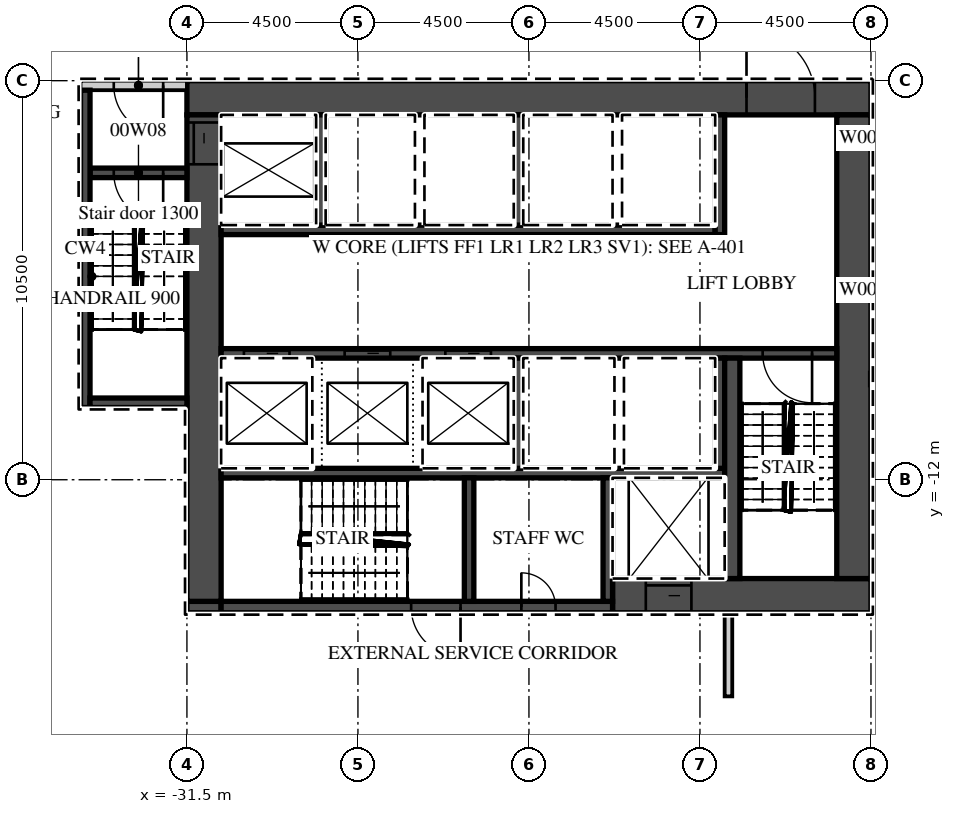
"""IFC4 building model, lengths in metres.
Left out: names, types, materials, properties, quantities, classifications, styles, units other than length and angle.
Written with IfcOpenShell. Run it as: python <this file> out.ifc"""

import sys

from ifc_helpers import new_model, si_unit, direction, frame, frame_2d, origin, place, context, subcontext, project, spatial, rectangle, extrude, element, fill, save


model = new_model("IFC4")
c1 = context("Model", 3, precision=1e-05, world=origin(), true_north=direction((0.0, 1.0)))
c2 = subcontext(c1, "Body", "Model", "MODEL_VIEW")
j1 = project(units=[si_unit("LENGTHUNIT", "METRE"), si_unit("PLANEANGLEUNIT", "RADIAN")], contexts=[c1])
p1 = place(None, origin())
s1 = spatial("IfcSite", under=j1, at=p1, CompositionType="ELEMENT")
p2 = place(p1, origin())
s2 = spatial("IfcBuilding", under=s1, at=p2, CompositionType="ELEMENT")
p3 = place(p2, origin())
s3 = spatial("IfcBuildingStorey", under=s2, at=p3, CompositionType="ELEMENT", Elevation=0.0)
p4 = place(p3, frame((-31.5, -1.95, 0.0), z_axis=(0.0, 0.0, 1.0), x_axis=(1.0, 0.0, 0.0)))
e1 = element("IfcWall", 1, at=p4, inside=s3, PredefinedType="SHEAR", context=c2, shape_type="SweptSolid", body=[
    extrude(rectangle(XDim=18.0, YDim=0.9, at=frame_2d((9.0, 0.0))), origin(), (0.0, 0.0, 1.0), 10.55),
])
p5 = place(p4, frame((14.725, 0.0, 0.0)))
e2 = element("IfcOpeningElement", 2, at=p5, cuts=e1, PredefinedType="OPENING", context=c2, shape_type="SweptSolid", body=[
    extrude(rectangle(XDim=1.8, YDim=2.1, at=frame_2d((0.9, 1.05))), frame((0.0, 0.46, 0.0), z_axis=(0.0, -1.0, 0.0), x_axis=(1.0, 0.0, 0.0)), (0.0, 0.0, 1.0), 0.92),
])
p6 = place(p3, frame((-20.3, -15.05, 0.0), z_axis=(0.0, 0.0, 1.0), x_axis=(1.0, 0.0, 0.0)))
e3 = element("IfcWall", 3, at=p6, inside=s3, PredefinedType="SHEAR", context=c2, shape_type="SweptSolid", body=[
    extrude(rectangle(XDim=6.8, YDim=0.9, at=frame_2d((3.4, 0.0))), origin(), (0.0, 0.0, 1.0), 10.55),
])
p7 = place(p6, frame((0.875, 0.0, 0.0)))
e4 = element("IfcOpeningElement", 4, at=p7, cuts=e3, PredefinedType="OPENING", context=c2, shape_type="SweptSolid", body=[
    extrude(rectangle(XDim=1.2, YDim=2.1, at=frame_2d((0.6, 1.05))), frame((0.0, 0.46, 0.0), z_axis=(0.0, -1.0, 0.0), x_axis=(1.0, 0.0, 0.0)), (0.0, 0.0, 1.0), 0.92),
])
p8 = place(p3, frame((-31.5, -15.35, 0.0), z_axis=(0.0, 0.0, 1.0), x_axis=(1.0, 0.0, 0.0)))
e5 = element("IfcWall", 5, at=p8, inside=s3, PredefinedType="SHEAR", context=c2, shape_type="SweptSolid", body=[
    extrude(rectangle(XDim=0.9, YDim=0.3, at=frame_2d((0.45, 0.0))), origin(), (0.0, 0.0, 1.0), 10.55),
])
p9 = place(p3, frame((-30.6, -15.35, 0.0), z_axis=(0.0, 0.0, 1.0), x_axis=(1.0, 0.0, 0.0)))
e6 = element("IfcWall", 6, at=p9, inside=s3, PredefinedType="SHEAR", context=c2, shape_type="SweptSolid", body=[
    extrude(rectangle(XDim=10.3, YDim=0.3, at=frame_2d((5.15, 0.0))), origin(), (0.0, 0.0, 1.0), 10.55),
])
p10 = place(p9, frame((5.0, 0.0, 0.0)))
e7 = element("IfcOpeningElement", 7, at=p10, cuts=e6, PredefinedType="OPENING", context=c2, shape_type="SweptSolid", body=[
    extrude(rectangle(XDim=1.3, YDim=2.1, at=frame_2d((0.65, 1.05))), frame((0.0, 0.16, 0.0), z_axis=(0.0, -1.0, 0.0), x_axis=(1.0, 0.0, 0.0)), (0.0, 0.0, 1.0), 0.32),
])
p11 = place(p9, frame((7.9, 0.0, 0.0)))
e8 = element("IfcOpeningElement", 8, at=p11, cuts=e6, PredefinedType="OPENING", context=c2, shape_type="SweptSolid", body=[
    extrude(rectangle(XDim=0.9, YDim=2.1, at=frame_2d((0.45, 1.05))), frame((0.0, 0.16, 0.0), z_axis=(0.0, -1.0, 0.0), x_axis=(1.0, 0.0, 0.0)), (0.0, 0.0, 1.0), 0.32),
])
p12 = place(p3, frame((-31.05, -15.2, 0.0), z_axis=(0.0, 0.0, 1.0), x_axis=(0.0, 1.0, 0.0)))
e9 = element("IfcWall", 9, at=p12, inside=s3, PredefinedType="SHEAR", context=c2, shape_type="SweptSolid", body=[
    extrude(rectangle(XDim=12.8, YDim=0.9, at=frame_2d((6.4, 0.0))), origin(), (0.0, 0.0, 1.0), 10.55),
])
p13 = place(p12, frame((11.5, 0.0, 0.0)))
e10 = element("IfcOpeningElement", 10, at=p13, cuts=e9, PredefinedType="OPENING", context=c2, shape_type="SweptSolid", body=[
    extrude(rectangle(XDim=1.1, YDim=2.1, at=frame_2d((0.55, 1.05))), frame((0.0, 0.46, 0.0), z_axis=(0.0, -1.0, 0.0), x_axis=(1.0, 0.0, 0.0)), (0.0, 0.0, 1.0), 0.92),
])
p14 = place(p3, frame((-13.95, -14.6, 0.0), z_axis=(0.0, 0.0, 1.0), x_axis=(0.0, 1.0, 0.0)))
e11 = element("IfcWall", 11, at=p14, inside=s3, PredefinedType="SHEAR", context=c2, shape_type="SweptSolid", body=[
    extrude(rectangle(XDim=12.2, YDim=0.9, at=frame_2d((6.1, 0.0))), origin(), (0.0, 0.0, 1.0), 10.55),
])
p15 = place(p3, frame((-30.6, -5.425, 0.0), z_axis=(0.0, 0.0, 1.0), x_axis=(1.0, 0.0, 0.0)))
e12 = element("IfcWall", 12, at=p15, inside=s3, PredefinedType="SHEAR", context=c2, shape_type="SweptSolid", body=[
    extrude(rectangle(XDim=13.0, YDim=0.25, at=frame_2d((6.5, 0.0))), origin(), (0.0, 0.0, 1.0), 10.55),
])
p16 = place(p3, frame((-17.475, -5.55, 0.0), z_axis=(0.0, 0.0, 1.0), x_axis=(0.0, 1.0, 0.0)))
e13 = element("IfcWall", 13, at=p16, inside=s3, PredefinedType="SHEAR", context=c2, shape_type="SweptSolid", body=[
    extrude(rectangle(XDim=3.15, YDim=0.25, at=frame_2d((1.575, 0.0))), origin(), (0.0, 0.0, 1.0), 10.55),
])
for number, where, z_axis, x_axis in (
    (14, (-27.975, -5.3, 0.0), (0.0, 0.0, 1.0), (0.0, 1.0, 0.0)),
    (15, (-22.775, -5.3, 0.0), (0.0, 0.0, 1.0), (0.0, 1.0, 0.0)),
):
    element("IfcWall", number, at=place(p3, frame(where, z_axis=z_axis, x_axis=x_axis)), inside=s3, PredefinedType="SHEAR", context=c2, shape_type="SweptSolid", body=[
        extrude(rectangle(XDim=2.9, YDim=0.25, at=frame_2d((1.45, 0.0))), origin(), (0.0, 0.0, 1.0), 10.55),
    ])
p17 = place(p3, frame((-30.6, -8.675, 0.0), z_axis=(0.0, 0.0, 1.0), x_axis=(1.0, 0.0, 0.0)))
e16 = element("IfcWall", 16, at=p17, inside=s3, PredefinedType="SHEAR", context=c2, shape_type="SweptSolid", body=[
    extrude(rectangle(XDim=16.2, YDim=0.25, at=frame_2d((8.1, 0.0))), origin(), (0.0, 0.0, 1.0), 10.55),
])
p18 = place(p17, frame((0.6, 0.0, 0.0)))
e17 = element("IfcOpeningElement", 17, at=p18, cuts=e16, PredefinedType="OPENING", context=c2, shape_type="SweptSolid", body=[
    extrude(rectangle(XDim=1.2, YDim=2.1, at=frame_2d((0.6, 1.05))), frame((0.0, 0.135, 0.0), z_axis=(0.0, -1.0, 0.0), x_axis=(1.0, 0.0, 0.0)), (0.0, 0.0, 1.0), 0.27),
])
p19 = place(p17, frame((3.25, 0.0, 0.0)))
e18 = element("IfcOpeningElement", 18, at=p19, cuts=e16, PredefinedType="OPENING", context=c2, shape_type="SweptSolid", body=[
    extrude(rectangle(XDim=1.2, YDim=2.1, at=frame_2d((0.6, 1.05))), frame((0.0, 0.135, 0.0), z_axis=(0.0, -1.0, 0.0), x_axis=(1.0, 0.0, 0.0)), (0.0, 0.0, 1.0), 0.27),
])
p20 = place(p17, frame((5.9, 0.0, 0.0)))
e19 = element("IfcOpeningElement", 19, at=p20, cuts=e16, PredefinedType="OPENING", context=c2, shape_type="SweptSolid", body=[
    extrude(rectangle(XDim=1.2, YDim=2.1, at=frame_2d((0.6, 1.05))), frame((0.0, 0.135, 0.0), z_axis=(0.0, -1.0, 0.0), x_axis=(1.0, 0.0, 0.0)), (0.0, 0.0, 1.0), 0.27),
])
p21 = place(p17, frame((14.25, 0.0, 0.0)))
e20 = element("IfcOpeningElement", 20, at=p21, cuts=e16, PredefinedType="OPENING", context=c2, shape_type="SweptSolid", body=[
    extrude(rectangle(XDim=1.3, YDim=2.1, at=frame_2d((0.65, 1.05))), frame((0.0, 0.135, 0.0), z_axis=(0.0, -1.0, 0.0), x_axis=(1.0, 0.0, 0.0)), (0.0, 0.0, 1.0), 0.27),
])
p22 = place(p3, frame((-30.6, -11.825, 0.0), z_axis=(0.0, 0.0, 1.0), x_axis=(1.0, 0.0, 0.0)))
e21 = element("IfcWall", 21, at=p22, inside=s3, PredefinedType="SHEAR", context=c2, shape_type="SweptSolid", body=[
    extrude(rectangle(XDim=13.25, YDim=0.25, at=frame_2d((6.625, 0.0))), origin(), (0.0, 0.0, 1.0), 10.55),
])
for number, where, z_axis, x_axis in (
    (22, (-17.475, -11.7, 0.0), (0.0, 0.0, 1.0), (0.0, 1.0, 0.0)),
    (23, (-22.775, -11.7, 0.0), (0.0, 0.0, 1.0), (0.0, 1.0, 0.0)),
):
    element("IfcWall", number, at=place(p3, frame(where, z_axis=z_axis, x_axis=x_axis)), inside=s3, PredefinedType="SHEAR", context=c2, shape_type="SweptSolid", body=[
        extrude(rectangle(XDim=2.9, YDim=0.25, at=frame_2d((1.45, 0.0))), origin(), (0.0, 0.0, 1.0), 10.55),
    ])
p23 = place(p3, frame((-17.15, -14.6, 0.0), z_axis=(0.0, 0.0, 1.0), x_axis=(0.0, 1.0, 0.0)))
e24 = element("IfcWall", 24, at=p23, inside=s3, PredefinedType="SHEAR", context=c2, shape_type="SweptSolid", body=[
    extrude(rectangle(XDim=5.8, YDim=0.4, at=frame_2d((2.9, 0.0))), origin(), (0.0, 0.0, 1.0), 10.55),
])
for number, where, z_axis, x_axis in (
    (25, (-20.425, -15.2, 0.0), (0.0, 0.0, 1.0), (0.0, 1.0, 0.0)),
    (26, (-24.075, -15.2, 0.0), (0.0, 0.0, 1.0), (0.0, 1.0, 0.0)),
):
    element("IfcWall", number, at=place(p3, frame(where, z_axis=z_axis, x_axis=x_axis)), inside=s3, PredefinedType="SHEAR", context=c2, shape_type="SweptSolid", body=[
        extrude(rectangle(XDim=3.25, YDim=0.25, at=frame_2d((1.625, 0.0))), origin(), (0.0, 0.0, 1.0), 10.55),
    ])
p24 = place(p3, frame((-34.3, -1.625, 0.0), z_axis=(0.0, 0.0, 1.0), x_axis=(1.0, 0.0, 0.0)))
e27 = element("IfcWall", 27, at=p24, inside=s3, PredefinedType="PARTITIONING", context=c2, shape_type="SweptSolid", body=[
    extrude(rectangle(XDim=2.8, YDim=0.25, at=frame_2d((1.4, 0.0))), origin(), (0.0, 0.0, 1.0), 10.55),
])
p25 = place(p24, frame((0.875, 0.0, 0.0)))
e28 = element("IfcOpeningElement", 28, at=p25, cuts=e27, PredefinedType="OPENING", context=c2, shape_type="SweptSolid", body=[
    extrude(rectangle(XDim=1.3, YDim=2.1, at=frame_2d((0.65, 1.05))), frame((0.0, 0.135, 0.0), z_axis=(0.0, -1.0, 0.0), x_axis=(1.0, 0.0, 0.0)), (0.0, 0.0, 1.0), 0.27),
])
p26 = place(p3, frame((-34.05, -3.925, 0.0), z_axis=(0.0, 0.0, 1.0), x_axis=(1.0, 0.0, 0.0)))
e29 = element("IfcWall", 29, at=p26, inside=s3, PredefinedType="SHEAR", context=c2, shape_type="SweptSolid", body=[
    extrude(rectangle(XDim=2.55, YDim=0.25, at=frame_2d((1.275, 0.0))), origin(), (0.0, 0.0, 1.0), 10.55),
])
p27 = place(p26, frame((0.625, 0.0, 0.0)))
e30 = element("IfcOpeningElement", 30, at=p27, cuts=e29, PredefinedType="OPENING", context=c2, shape_type="SweptSolid", body=[
    extrude(rectangle(XDim=1.3, YDim=2.1, at=frame_2d((0.65, 1.05))), frame((0.0, 0.135, 0.0), z_axis=(0.0, -1.0, 0.0), x_axis=(1.0, 0.0, 0.0)), (0.0, 0.0, 1.0), 0.27),
])
p28 = place(p3, frame((-34.175, -10.1, 0.0), z_axis=(0.0, 0.0, 1.0), x_axis=(0.0, 1.0, 0.0)))
e31 = element("IfcWall", 31, at=p28, inside=s3, PredefinedType="SHEAR", context=c2, shape_type="SweptSolid", body=[
    extrude(rectangle(XDim=8.35, YDim=0.25, at=frame_2d((4.175, 0.0))), origin(), (0.0, 0.0, 1.0), 10.55),
])
p29 = place(p3, frame((-34.05, -9.975, 0.0), z_axis=(0.0, 0.0, 1.0), x_axis=(1.0, 0.0, 0.0)))
e32 = element("IfcWall", 32, at=p29, inside=s3, PredefinedType="SHEAR", context=c2, shape_type="SweptSolid", body=[
    extrude(rectangle(XDim=2.55, YDim=0.25, at=frame_2d((1.275, 0.0))), origin(), (0.0, 0.0, 1.0), 10.55),
])
p30 = place(p3, frame((-17.25, -17.7, 0.0), z_axis=(0.0, 0.0, 1.0), x_axis=(0.0, 1.0, 0.0)))
e33 = element("IfcWall", 33, at=p30, inside=s3, PredefinedType="PARTITIONING", context=c2, shape_type="SweptSolid", body=[
    extrude(rectangle(XDim=2.2, YDim=0.2, at=frame_2d((1.1, 0.0))), origin(), (0.0, 0.0, 1.0), 10.55),
])
p31 = place(p3, frame((-13.51, -9.35, 0.0), z_axis=(0.0, 0.0, 1.0), x_axis=(1.0, 0.0, 0.0)))
e34 = element("IfcWall", 34, at=p31, inside=s3, PredefinedType="SOLIDWALL", context=c2, shape_type="SweptSolid", body=[
    extrude(rectangle(XDim=27.02, YDim=0.3, at=frame_2d((13.51, 0.0))), origin(), (0.0, 0.0, 1.0), 10.55),
])
p32 = place(p31, frame((9.61, 0.0, 0.0)))
e35 = element("IfcOpeningElement", 35, at=p32, cuts=e34, PredefinedType="OPENING", context=c2, shape_type="SweptSolid", body=[
    extrude(rectangle(XDim=1.8, YDim=2.1, at=frame_2d((0.9, 1.05))), frame((0.0, 0.16, 0.0), z_axis=(0.0, -1.0, 0.0), x_axis=(1.0, 0.0, 0.0)), (0.0, 0.0, 1.0), 0.32),
])
p33 = place(p31, frame((15.61, 0.0, 0.0)))
e36 = element("IfcOpeningElement", 36, at=p33, cuts=e34, PredefinedType="OPENING", context=c2, shape_type="SweptSolid", body=[
    extrude(rectangle(XDim=1.8, YDim=2.1, at=frame_2d((0.9, 1.05))), frame((0.0, 0.16, 0.0), z_axis=(0.0, -1.0, 0.0), x_axis=(1.0, 0.0, 0.0)), (0.0, 0.0, 1.0), 0.32),
])
p34 = place(p31, frame((23.16, 0.0, 0.0)))
e37 = element("IfcOpeningElement", 37, at=p34, cuts=e34, PredefinedType="OPENING", context=c2, shape_type="SweptSolid", body=[
    extrude(rectangle(XDim=1.3, YDim=2.1, at=frame_2d((0.65, 1.05))), frame((0.0, 0.16, 0.0), z_axis=(0.0, -1.0, 0.0), x_axis=(1.0, 0.0, 0.0)), (0.0, 0.0, 1.0), 0.32),
])
p35 = place(p31, frame((2.81, 0.0, 0.2)))
e38 = element("IfcOpeningElement", 38, at=p35, cuts=e34, PredefinedType="OPENING", context=c2, shape_type="SweptSolid", body=[
    extrude(rectangle(XDim=2.4, YDim=3.2, at=frame_2d((1.2, 1.6))), frame((0.0, 0.16, 0.0), z_axis=(0.0, -1.0, 0.0), x_axis=(1.0, 0.0, 0.0)), (0.0, 0.0, 1.0), 0.32),
])
p36 = place(p18, origin())
e39 = element("IfcDoor", 39, at=p36, inside=s3, OperationType="SLIDING_TO_LEFT", PredefinedType="DOOR", context=c2, shape_type="SweptSolid", body=[
    extrude(rectangle(XDim=1.2, YDim=2.1, at=frame_2d((0.6, 1.05))), frame((0.0, 0.025, 0.0), z_axis=(0.0, -1.0, 0.0), x_axis=(1.0, 0.0, 0.0)), (0.0, 0.0, 1.0), 0.05),
])
fill(e17, e39)
p37 = place(p19, origin())
e40 = element("IfcDoor", 40, at=p37, inside=s3, OperationType="SLIDING_TO_RIGHT", PredefinedType="DOOR", context=c2, shape_type="SweptSolid", body=[
    extrude(rectangle(XDim=1.2, YDim=2.1, at=frame_2d((0.6, 1.05))), frame((0.0, 0.025, 0.0), z_axis=(0.0, -1.0, 0.0), x_axis=(1.0, 0.0, 0.0)), (0.0, 0.0, 1.0), 0.05),
])
fill(e18, e40)
p38 = place(p20, origin())
e41 = element("IfcDoor", 41, at=p38, inside=s3, OperationType="SLIDING_TO_RIGHT", PredefinedType="DOOR", context=c2, shape_type="SweptSolid", body=[
    extrude(rectangle(XDim=1.2, YDim=2.1, at=frame_2d((0.6, 1.05))), frame((0.0, 0.025, 0.0), z_axis=(0.0, -1.0, 0.0), x_axis=(1.0, 0.0, 0.0)), (0.0, 0.0, 1.0), 0.05),
])
fill(e19, e41)
p39 = place(p7, origin())
e42 = element("IfcDoor", 42, at=p39, inside=s3, OperationType="SLIDING_TO_LEFT", PredefinedType="DOOR", context=c2, shape_type="SweptSolid", body=[
    extrude(rectangle(XDim=1.2, YDim=2.1, at=frame_2d((0.6, 1.05))), frame((0.0, 0.025, 0.0), z_axis=(0.0, -1.0, 0.0), x_axis=(1.0, 0.0, 0.0)), (0.0, 0.0, 1.0), 0.05),
])
fill(e4, e42)
p40 = place(p13, origin())
e43 = element("IfcDoor", 43, at=p40, inside=s3, OperationType="SLIDING_TO_RIGHT", PredefinedType="DOOR", context=c2, shape_type="SweptSolid", body=[
    extrude(rectangle(XDim=1.1, YDim=2.1, at=frame_2d((0.55, 1.05))), frame((0.0, 0.025, 0.0), z_axis=(0.0, -1.0, 0.0), x_axis=(1.0, 0.0, 0.0)), (0.0, 0.0, 1.0), 0.05),
])
fill(e10, e43)
p41 = place(p5, origin())
e44 = element("IfcDoor", 44, at=p41, inside=s3, OperationType="DOUBLE_DOOR_DOUBLE_SWING", PredefinedType="DOOR", context=c2, shape_type="SweptSolid", body=[
    extrude(rectangle(XDim=1.8, YDim=2.1, at=frame_2d((0.9, 1.05))), frame((0.0, 0.025, 0.0), z_axis=(0.0, -1.0, 0.0), x_axis=(1.0, 0.0, 0.0)), (0.0, 0.0, 1.0), 0.05),
])
fill(e2, e44)
p42 = place(p25, frame((1.3, 0.0, 0.0), z_axis=(0.0, 0.0, 1.0), x_axis=(-1.0, 0.0, 0.0)))
e45 = element("IfcDoor", 45, at=p42, inside=s3, OperationType="SINGLE_SWING_RIGHT", PredefinedType="DOOR", context=c2, shape_type="SweptSolid", body=[
    extrude(rectangle(XDim=1.3, YDim=2.1, at=frame_2d((0.65, 1.05))), frame((0.0, 0.025, 0.0), z_axis=(0.0, -1.0, 0.0), x_axis=(1.0, 0.0, 0.0)), (0.0, 0.0, 1.0), 0.05),
])
fill(e28, e45)
p43 = place(p27, origin())
e46 = element("IfcDoor", 46, at=p43, inside=s3, OperationType="SINGLE_SWING_RIGHT", PredefinedType="DOOR", context=c2, shape_type="SweptSolid", body=[
    extrude(rectangle(XDim=1.3, YDim=2.1, at=frame_2d((0.65, 1.05))), frame((0.0, 0.025, 0.0), z_axis=(0.0, -1.0, 0.0), x_axis=(1.0, 0.0, 0.0)), (0.0, 0.0, 1.0), 0.05),
])
fill(e30, e46)
p44 = place(p21, origin())
e47 = element("IfcDoor", 47, at=p44, inside=s3, OperationType="SINGLE_SWING_RIGHT", PredefinedType="DOOR", context=c2, shape_type="SweptSolid", body=[
    extrude(rectangle(XDim=1.3, YDim=2.1, at=frame_2d((0.65, 1.05))), frame((0.0, 0.025, 0.0), z_axis=(0.0, -1.0, 0.0), x_axis=(1.0, 0.0, 0.0)), (0.0, 0.0, 1.0), 0.05),
])
fill(e20, e47)
p45 = place(p10, frame((1.3, 0.0, 0.0), z_axis=(0.0, 0.0, 1.0), x_axis=(-1.0, 0.0, 0.0)))
e48 = element("IfcDoor", 48, at=p45, inside=s3, OperationType="SINGLE_SWING_RIGHT", PredefinedType="DOOR", context=c2, shape_type="SweptSolid", body=[
    extrude(rectangle(XDim=1.3, YDim=2.1, at=frame_2d((0.65, 1.05))), frame((0.0, 0.025, 0.0), z_axis=(0.0, -1.0, 0.0), x_axis=(1.0, 0.0, 0.0)), (0.0, 0.0, 1.0), 0.05),
])
fill(e7, e48)
p46 = place(p11, origin())
e49 = element("IfcDoor", 49, at=p46, inside=s3, OperationType="SINGLE_SWING_LEFT", PredefinedType="DOOR", context=c2, shape_type="SweptSolid", body=[
    extrude(rectangle(XDim=0.9, YDim=2.1, at=frame_2d((0.45, 1.05))), frame((0.0, 0.025, 0.0), z_axis=(0.0, -1.0, 0.0), x_axis=(1.0, 0.0, 0.0)), (0.0, 0.0, 1.0), 0.05),
])
fill(e8, e49)
save(model, sys.argv[1])
